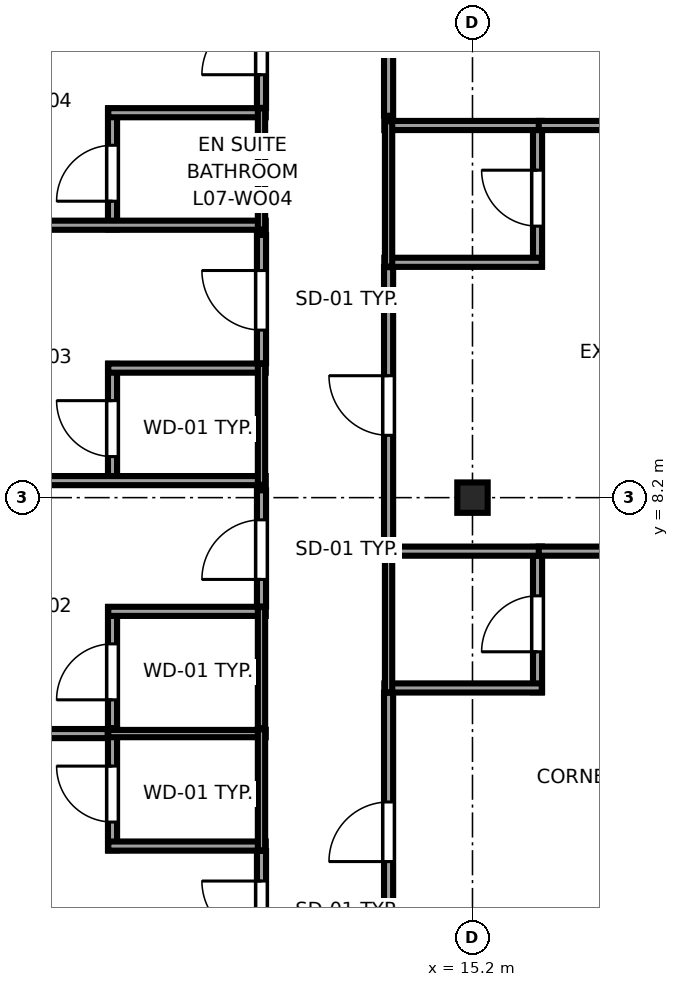
"""IFC4 building model, lengths in metres.
Left out: names, types, materials, properties, quantities, classifications, styles, units other than length and angle.
Written with IfcOpenShell. Run it as: python <this file> out.ifc"""

import sys

from ifc_helpers import new_model, si_unit, direction, frame, frame_2d, origin, origin_2d, place, context, subcontext, project, spatial, rectangle, i_section, extrude, source, transform, mapped, element, fill, save


model = new_model("IFC4")
c1 = context("Model", 3, precision=1e-05, world=origin(), true_north=direction((0.0, 1.0)))
c2 = subcontext(c1, "Body", "Model", "MODEL_VIEW")
j1 = project(units=[si_unit("LENGTHUNIT", "METRE"), si_unit("PLANEANGLEUNIT", "RADIAN")], contexts=[c1])
p1 = place(None, origin())
s1 = spatial("IfcSite", under=j1, at=p1, CompositionType="ELEMENT")
p2 = place(p1, origin())
s2 = spatial("IfcBuilding", under=s1, at=p2, CompositionType="ELEMENT")
p3 = place(p2, frame((0.0, 0.0, 35.55)))
s3 = spatial("IfcBuildingStorey", under=s2, at=p3, CompositionType="ELEMENT", Elevation=35.55)
m1 = source(origin(), c2, "Body", "SweptSolid", [
    extrude(i_section(OverallWidth=0.5, OverallDepth=0.5, WebThickness=0.028, FlangeThickness=0.045, at=origin_2d()), origin(), (0.0, 0.0, 1.0), 3.55),
])
p4 = place(p3, frame((15.2, 8.2, 0.0), z_axis=(0.0, 0.0, 1.0), x_axis=(1.0, 0.0, 0.0)))
e1 = element("IfcColumn", 1, at=p4, inside=s3, PredefinedType="COLUMN", context=c2, shape_type="MappedRepresentation", body=[
    mapped(m1, transform((0.0, 0.0, 0.0), x_axis=(1.0, 0.0, 0.0), y_axis=(0.0, 1.0, 0.0), z_axis=(0.0, 0.0, 1.0), scale=1.0)),
])
p5 = place(p3, frame((9.28, 2.4, 0.0), z_axis=(0.0, 0.0, 1.0), x_axis=(0.0, 1.0, 0.0)))
e2 = element("IfcWall", 2, at=p5, inside=s3, PredefinedType="PARTITIONING", context=c2, shape_type="SweptSolid", body=[
    extrude(rectangle(XDim=1.99, YDim=0.15, at=frame_2d((0.995, 0.0))), origin(), (0.0, 0.0, 1.0), 3.37),
])
p6 = place(p5, frame((0.465, 0.0, 0.0)))
e3 = element("IfcOpeningElement", 3, at=p6, cuts=e2, PredefinedType="OPENING", context=c2, shape_type="SweptSolid", body=[
    extrude(rectangle(XDim=0.92, YDim=2.01, at=frame_2d((0.46, 1.005))), frame((0.0, 0.085, 0.0), z_axis=(0.0, -1.0, 0.0), x_axis=(1.0, 0.0, 0.0)), (0.0, 0.0, 1.0), 0.17),
])
p7 = place(p3, frame((9.21, 2.47, 0.0), z_axis=(0.0, 0.0, 1.0), x_axis=(1.0, 0.0, 0.0)))
e4 = element("IfcWall", 4, at=p7, inside=s3, PredefinedType="PARTITIONING", context=c2, shape_type="SweptSolid", body=[
    extrude(rectangle(XDim=2.59, YDim=0.15, at=frame_2d((1.295, 0.0))), origin(), (0.0, 0.0, 1.0), 3.37),
])
p8 = place(p3, frame((9.21, 4.32, 0.0), z_axis=(0.0, 0.0, 1.0), x_axis=(1.0, 0.0, 0.0)))
e5 = element("IfcWall", 5, at=p8, inside=s3, PredefinedType="PLUMBINGWALL", context=c2, shape_type="SweptSolid", body=[
    extrude(rectangle(XDim=2.59, YDim=0.12, at=frame_2d((1.295, 0.0))), origin(), (0.0, 0.0, 1.0), 3.37),
])
p9 = place(p3, frame((11.73, 2.4, 0.0), z_axis=(0.0, 0.0, 1.0), x_axis=(0.0, 1.0, 0.0)))
e6 = element("IfcWall", 6, at=p9, inside=s3, PredefinedType="PLUMBINGWALL", context=c2, shape_type="SweptSolid", body=[
    extrude(rectangle(XDim=1.99, YDim=0.12, at=frame_2d((0.995, 0.0))), origin(), (0.0, 0.0, 1.0), 3.37),
])
p10 = place(p3, frame((9.28, 4.41, 0.0), z_axis=(0.0, 0.0, 1.0), x_axis=(0.0, 1.0, 0.0)))
e7 = element("IfcWall", 7, at=p10, inside=s3, PredefinedType="PARTITIONING", context=c2, shape_type="SweptSolid", body=[
    extrude(rectangle(XDim=1.99, YDim=0.15, at=frame_2d((0.995, 0.0))), origin(), (0.0, 0.0, 1.0), 3.37),
])
p11 = place(p10, frame((0.465, 0.0, 0.0)))
e8 = element("IfcOpeningElement", 8, at=p11, cuts=e7, PredefinedType="OPENING", context=c2, shape_type="SweptSolid", body=[
    extrude(rectangle(XDim=0.92, YDim=2.01, at=frame_2d((0.46, 1.005))), frame((0.0, 0.085, 0.0), z_axis=(0.0, -1.0, 0.0), x_axis=(1.0, 0.0, 0.0)), (0.0, 0.0, 1.0), 0.17),
])
p12 = place(p3, frame((9.21, 6.33, 0.0), z_axis=(0.0, 0.0, 1.0), x_axis=(1.0, 0.0, 0.0)))
e9 = element("IfcWall", 9, at=p12, inside=s3, PredefinedType="PARTITIONING", context=c2, shape_type="SweptSolid", body=[
    extrude(rectangle(XDim=2.59, YDim=0.15, at=frame_2d((1.295, 0.0))), origin(), (0.0, 0.0, 1.0), 3.37),
])
p13 = place(p3, frame((11.73, 4.41, 0.0), z_axis=(0.0, 0.0, 1.0), x_axis=(0.0, 1.0, 0.0)))
e10 = element("IfcWall", 10, at=p13, inside=s3, PredefinedType="PLUMBINGWALL", context=c2, shape_type="SweptSolid", body=[
    extrude(rectangle(XDim=1.99, YDim=0.12, at=frame_2d((0.995, 0.0))), origin(), (0.0, 0.0, 1.0), 3.37),
])
p14 = place(p3, frame((9.28, 8.41, 0.0), z_axis=(0.0, 0.0, 1.0), x_axis=(0.0, 1.0, 0.0)))
e11 = element("IfcWall", 11, at=p14, inside=s3, PredefinedType="PARTITIONING", context=c2, shape_type="SweptSolid", body=[
    extrude(rectangle(XDim=1.99, YDim=0.15, at=frame_2d((0.995, 0.0))), origin(), (0.0, 0.0, 1.0), 3.37),
])
p15 = place(p14, frame((0.465, 0.0, 0.0)))
e12 = element("IfcOpeningElement", 12, at=p15, cuts=e11, PredefinedType="OPENING", context=c2, shape_type="SweptSolid", body=[
    extrude(rectangle(XDim=0.92, YDim=2.01, at=frame_2d((0.46, 1.005))), frame((0.0, 0.085, 0.0), z_axis=(0.0, -1.0, 0.0), x_axis=(1.0, 0.0, 0.0)), (0.0, 0.0, 1.0), 0.17),
])
p16 = place(p3, frame((0.405, 8.48, 0.0), z_axis=(0.0, 0.0, 1.0), x_axis=(1.0, 0.0, 0.0)))
e13 = element("IfcWall", 13, at=p16, inside=s3, PredefinedType="PARTITIONING", context=c2, shape_type="SweptSolid", body=[
    extrude(rectangle(XDim=11.395, YDim=0.15, at=frame_2d((5.698, 0.0))), origin(), (0.0, 0.0, 1.0), 3.37),
])
p17 = place(p3, frame((9.21, 10.33, 0.0), z_axis=(0.0, 0.0, 1.0), x_axis=(1.0, 0.0, 0.0)))
e14 = element("IfcWall", 14, at=p17, inside=s3, PredefinedType="PARTITIONING", context=c2, shape_type="SweptSolid", body=[
    extrude(rectangle(XDim=2.59, YDim=0.15, at=frame_2d((1.295, 0.0))), origin(), (0.0, 0.0, 1.0), 3.37),
])
p18 = place(p3, frame((11.73, 8.41, 0.0), z_axis=(0.0, 0.0, 1.0), x_axis=(0.0, 1.0, 0.0)))
e15 = element("IfcWall", 15, at=p18, inside=s3, PredefinedType="PLUMBINGWALL", context=c2, shape_type="SweptSolid", body=[
    extrude(rectangle(XDim=1.99, YDim=0.12, at=frame_2d((0.995, 0.0))), origin(), (0.0, 0.0, 1.0), 3.37),
])
p19 = place(p3, frame((9.28, 12.61, 0.0), z_axis=(0.0, 0.0, 1.0), x_axis=(0.0, 1.0, 0.0)))
e16 = element("IfcWall", 16, at=p19, inside=s3, PredefinedType="PARTITIONING", context=c2, shape_type="SweptSolid", body=[
    extrude(rectangle(XDim=1.99, YDim=0.15, at=frame_2d((0.995, 0.0))), origin(), (0.0, 0.0, 1.0), 3.37),
])
p20 = place(p19, frame((0.465, 0.0, 0.0)))
e17 = element("IfcOpeningElement", 17, at=p20, cuts=e16, PredefinedType="OPENING", context=c2, shape_type="SweptSolid", body=[
    extrude(rectangle(XDim=0.92, YDim=2.01, at=frame_2d((0.46, 1.005))), frame((0.0, 0.085, 0.0), z_axis=(0.0, -1.0, 0.0), x_axis=(1.0, 0.0, 0.0)), (0.0, 0.0, 1.0), 0.17),
])
p21 = place(p3, frame((0.405, 12.68, 0.0), z_axis=(0.0, 0.0, 1.0), x_axis=(1.0, 0.0, 0.0)))
e18 = element("IfcWall", 18, at=p21, inside=s3, PredefinedType="PARTITIONING", context=c2, shape_type="SweptSolid", body=[
    extrude(rectangle(XDim=11.395, YDim=0.15, at=frame_2d((5.698, 0.0))), origin(), (0.0, 0.0, 1.0), 3.37),
])
p22 = place(p3, frame((9.21, 14.53, 0.0), z_axis=(0.0, 0.0, 1.0), x_axis=(1.0, 0.0, 0.0)))
e19 = element("IfcWall", 19, at=p22, inside=s3, PredefinedType="PARTITIONING", context=c2, shape_type="SweptSolid", body=[
    extrude(rectangle(XDim=2.59, YDim=0.15, at=frame_2d((1.295, 0.0))), origin(), (0.0, 0.0, 1.0), 3.37),
])
p23 = place(p3, frame((11.73, 12.61, 0.0), z_axis=(0.0, 0.0, 1.0), x_axis=(0.0, 1.0, 0.0)))
e20 = element("IfcWall", 20, at=p23, inside=s3, PredefinedType="PLUMBINGWALL", context=c2, shape_type="SweptSolid", body=[
    extrude(rectangle(XDim=1.99, YDim=0.12, at=frame_2d((0.995, 0.0))), origin(), (0.0, 0.0, 1.0), 3.37),
])
p24 = place(p3, frame((16.27, 5.0, 0.0), z_axis=(0.0, 0.0, 1.0), x_axis=(0.0, 1.0, 0.0)))
e21 = element("IfcWall", 21, at=p24, inside=s3, PredefinedType="PARTITIONING", context=c2, shape_type="SweptSolid", body=[
    extrude(rectangle(XDim=2.39, YDim=0.15, at=frame_2d((1.195, 0.0))), origin(), (0.0, 0.0, 1.0), 3.37),
])
p25 = place(p24, frame((0.665, 0.0, 0.0)))
e22 = element("IfcOpeningElement", 22, at=p25, cuts=e21, PredefinedType="OPENING", context=c2, shape_type="SweptSolid", body=[
    extrude(rectangle(XDim=0.92, YDim=2.01, at=frame_2d((0.46, 1.005))), frame((0.0, 0.085, 0.0), z_axis=(0.0, -1.0, 0.0), x_axis=(1.0, 0.0, 0.0)), (0.0, 0.0, 1.0), 0.17),
])
for number, where, z_axis, x_axis in (
    (23, (13.75, 5.07, 0.0), (0.0, 0.0, 1.0), (1.0, 0.0, 0.0)),
    (24, (13.75, 7.32, 0.0), (0.0, 0.0, 1.0), (1.0, 0.0, 0.0)),
):
    element("IfcWall", number, at=place(p3, frame(where, z_axis=z_axis, x_axis=x_axis)), inside=s3, PredefinedType="PARTITIONING", context=c2, shape_type="SweptSolid", body=[
        extrude(rectangle(XDim=2.59, YDim=0.15, at=frame_2d((1.295, 0.0))), origin(), (0.0, 0.0, 1.0), 3.37),
    ])
p26 = place(p3, frame((13.82, 5.0, 0.0), z_axis=(0.0, 0.0, 1.0), x_axis=(0.0, 1.0, 0.0)))
e25 = element("IfcWall", 25, at=p26, inside=s3, PredefinedType="PLUMBINGWALL", context=c2, shape_type="SweptSolid", body=[
    extrude(rectangle(XDim=2.39, YDim=0.12, at=frame_2d((1.195, 0.0))), origin(), (0.0, 0.0, 1.0), 3.37),
])
p27 = place(p3, frame((16.27, 12.0, 0.0), z_axis=(0.0, 0.0, 1.0), x_axis=(0.0, 1.0, 0.0)))
e26 = element("IfcWall", 26, at=p27, inside=s3, PredefinedType="PARTITIONING", context=c2, shape_type="SweptSolid", body=[
    extrude(rectangle(XDim=2.39, YDim=0.15, at=frame_2d((1.195, 0.0))), origin(), (0.0, 0.0, 1.0), 3.37),
])
p28 = place(p27, frame((0.665, 0.0, 0.0)))
e27 = element("IfcOpeningElement", 27, at=p28, cuts=e26, PredefinedType="OPENING", context=c2, shape_type="SweptSolid", body=[
    extrude(rectangle(XDim=0.92, YDim=2.01, at=frame_2d((0.46, 1.005))), frame((0.0, 0.085, 0.0), z_axis=(0.0, -1.0, 0.0), x_axis=(1.0, 0.0, 0.0)), (0.0, 0.0, 1.0), 0.17),
])
for number, where, z_axis, x_axis in (
    (28, (13.75, 12.07, 0.0), (0.0, 0.0, 1.0), (1.0, 0.0, 0.0)),
    (29, (13.75, 14.32, 0.0), (0.0, 0.0, 1.0), (1.0, 0.0, 0.0)),
):
    element("IfcWall", number, at=place(p3, frame(where, z_axis=z_axis, x_axis=x_axis)), inside=s3, PredefinedType="PARTITIONING", context=c2, shape_type="SweptSolid", body=[
        extrude(rectangle(XDim=2.59, YDim=0.15, at=frame_2d((1.295, 0.0))), origin(), (0.0, 0.0, 1.0), 3.37),
    ])
p29 = place(p3, frame((13.82, 12.0, 0.0), z_axis=(0.0, 0.0, 1.0), x_axis=(0.0, 1.0, 0.0)))
e30 = element("IfcWall", 30, at=p29, inside=s3, PredefinedType="PLUMBINGWALL", context=c2, shape_type="SweptSolid", body=[
    extrude(rectangle(XDim=2.39, YDim=0.12, at=frame_2d((1.195, 0.0))), origin(), (0.0, 0.0, 1.0), 3.37),
])
p30 = place(p3, frame((11.73, 0.405, 0.0), z_axis=(0.0, 0.0, 1.0), x_axis=(0.0, 1.0, 0.0)))
e31 = element("IfcWall", 31, at=p30, inside=s3, PredefinedType="PARTITIONING", context=c2, shape_type="SweptSolid", body=[
    extrude(rectangle(XDim=1.985, YDim=0.15, at=frame_2d((0.992, 0.0))), origin(), (0.0, 0.0, 1.0), 3.37),
])
p31 = place(p30, frame((0.51, 0.0, 0.0)))
e32 = element("IfcOpeningElement", 32, at=p31, cuts=e31, PredefinedType="OPENING", context=c2, shape_type="SweptSolid", body=[
    extrude(rectangle(XDim=0.98, YDim=2.12, at=frame_2d((0.49, 1.06))), frame((0.0, 0.085, 0.0), z_axis=(0.0, -1.0, 0.0), x_axis=(1.0, 0.0, 0.0)), (0.0, 0.0, 1.0), 0.17),
])
p32 = place(p3, frame((0.437, 4.32, 0.0), z_axis=(0.0, 0.0, 1.0), x_axis=(1.0, 0.0, 0.0)))
e33 = element("IfcWall", 33, at=p32, inside=s3, PredefinedType="PARTITIONING", context=c2, shape_type="SweptSolid", body=[
    extrude(rectangle(XDim=8.763, YDim=0.15, at=frame_2d((4.381, 0.0))), origin(), (0.0, 0.0, 1.0), 3.37),
])
p33 = place(p3, frame((11.73, 6.41, 0.0), z_axis=(0.0, 0.0, 1.0), x_axis=(0.0, 1.0, 0.0)))
e34 = element("IfcWall", 34, at=p33, inside=s3, PredefinedType="PARTITIONING", context=c2, shape_type="SweptSolid", body=[
    extrude(rectangle(XDim=1.91, YDim=0.15, at=frame_2d((0.955, 0.0))), origin(), (0.0, 0.0, 1.0), 3.37),
])
p34 = place(p33, frame((0.445, 0.0, 0.0)))
e35 = element("IfcOpeningElement", 35, at=p34, cuts=e34, PredefinedType="OPENING", context=c2, shape_type="SweptSolid", body=[
    extrude(rectangle(XDim=0.98, YDim=2.12, at=frame_2d((0.49, 1.06))), frame((0.0, 0.085, 0.0), z_axis=(0.0, -1.0, 0.0), x_axis=(1.0, 0.0, 0.0)), (0.0, 0.0, 1.0), 0.17),
])
p35 = place(p3, frame((11.73, 10.41, 0.0), z_axis=(0.0, 0.0, 1.0), x_axis=(0.0, 1.0, 0.0)))
e36 = element("IfcWall", 36, at=p35, inside=s3, PredefinedType="PARTITIONING", context=c2, shape_type="SweptSolid", body=[
    extrude(rectangle(XDim=2.11, YDim=0.15, at=frame_2d((1.055, 0.0))), origin(), (0.0, 0.0, 1.0), 3.37),
])
p36 = place(p35, frame((0.545, 0.0, 0.0)))
e37 = element("IfcOpeningElement", 37, at=p36, cuts=e36, PredefinedType="OPENING", context=c2, shape_type="SweptSolid", body=[
    extrude(rectangle(XDim=0.98, YDim=2.12, at=frame_2d((0.49, 1.06))), frame((0.0, 0.085, 0.0), z_axis=(0.0, -1.0, 0.0), x_axis=(1.0, 0.0, 0.0)), (0.0, 0.0, 1.0), 0.17),
])
p37 = place(p3, frame((11.73, 14.61, 0.0), z_axis=(0.0, 0.0, 1.0), x_axis=(0.0, 1.0, 0.0)))
e38 = element("IfcWall", 38, at=p37, inside=s3, PredefinedType="PARTITIONING", context=c2, shape_type="SweptSolid", body=[
    extrude(rectangle(XDim=2.11, YDim=0.15, at=frame_2d((1.055, 0.0))), origin(), (0.0, 0.0, 1.0), 3.37),
])
p38 = place(p37, frame((0.545, 0.0, 0.0)))
e39 = element("IfcOpeningElement", 39, at=p38, cuts=e38, PredefinedType="OPENING", context=c2, shape_type="SweptSolid", body=[
    extrude(rectangle(XDim=0.98, YDim=2.12, at=frame_2d((0.49, 1.06))), frame((0.0, 0.085, 0.0), z_axis=(0.0, -1.0, 0.0), x_axis=(1.0, 0.0, 0.0)), (0.0, 0.0, 1.0), 0.17),
])
p39 = place(p3, frame((13.82, 0.405, 0.0), z_axis=(0.0, 0.0, 1.0), x_axis=(0.0, 1.0, 0.0)))
e40 = element("IfcWall", 40, at=p39, inside=s3, PredefinedType="PARTITIONING", context=c2, shape_type="SweptSolid", body=[
    extrude(rectangle(XDim=4.585, YDim=0.15, at=frame_2d((2.292, 0.0))), origin(), (0.0, 0.0, 1.0), 3.37),
])
p40 = place(p39, frame((1.81, 0.0, 0.0)))
e41 = element("IfcOpeningElement", 41, at=p40, cuts=e40, PredefinedType="OPENING", context=c2, shape_type="SweptSolid", body=[
    extrude(rectangle(XDim=0.98, YDim=2.12, at=frame_2d((0.49, 1.06))), frame((0.0, 0.085, 0.0), z_axis=(0.0, -1.0, 0.0), x_axis=(1.0, 0.0, 0.0)), (0.0, 0.0, 1.0), 0.17),
])
p41 = place(p3, frame((16.29, 7.32, 0.0), z_axis=(0.0, 0.0, 1.0), x_axis=(1.0, 0.0, 0.0)))
e42 = element("IfcWall", 42, at=p41, inside=s3, PredefinedType="PARTITIONING", context=c2, shape_type="SweptSolid", body=[
    extrude(rectangle(XDim=6.06, YDim=0.15, at=frame_2d((3.03, 0.0))), origin(), (0.0, 0.0, 1.0), 3.37),
])
p42 = place(p3, frame((13.82, 7.48, 0.0), z_axis=(0.0, 0.0, 1.0), x_axis=(0.0, 1.0, 0.0)))
e43 = element("IfcWall", 43, at=p42, inside=s3, PredefinedType="PARTITIONING", context=c2, shape_type="SweptSolid", body=[
    extrude(rectangle(XDim=4.51, YDim=0.15, at=frame_2d((2.255, 0.0))), origin(), (0.0, 0.0, 1.0), 3.37),
])
p43 = place(p42, frame((1.745, 0.0, 0.0)))
e44 = element("IfcOpeningElement", 44, at=p43, cuts=e43, PredefinedType="OPENING", context=c2, shape_type="SweptSolid", body=[
    extrude(rectangle(XDim=0.98, YDim=2.12, at=frame_2d((0.49, 1.06))), frame((0.0, 0.085, 0.0), z_axis=(0.0, -1.0, 0.0), x_axis=(1.0, 0.0, 0.0)), (0.0, 0.0, 1.0), 0.17),
])
p44 = place(p3, frame((16.29, 14.32, 0.0), z_axis=(0.0, 0.0, 1.0), x_axis=(1.0, 0.0, 0.0)))
e45 = element("IfcWall", 45, at=p44, inside=s3, PredefinedType="PARTITIONING", context=c2, shape_type="SweptSolid", body=[
    extrude(rectangle(XDim=6.06, YDim=0.15, at=frame_2d((3.03, 0.0))), origin(), (0.0, 0.0, 1.0), 3.37),
])
p45 = place(p3, frame((13.82, 14.48, 0.0), z_axis=(0.0, 0.0, 1.0), x_axis=(0.0, 1.0, 0.0)))
e46 = element("IfcWall", 46, at=p45, inside=s3, PredefinedType="PARTITIONING", context=c2, shape_type="SweptSolid", body=[
    extrude(rectangle(XDim=4.41, YDim=0.15, at=frame_2d((2.205, 0.0))), origin(), (0.0, 0.0, 1.0), 3.37),
])
p46 = place(p45, frame((1.995, 0.0, 0.0)))
e47 = element("IfcOpeningElement", 47, at=p46, cuts=e46, PredefinedType="OPENING", context=c2, shape_type="SweptSolid", body=[
    extrude(rectangle(XDim=0.98, YDim=2.12, at=frame_2d((0.49, 1.06))), frame((0.0, 0.085, 0.0), z_axis=(0.0, -1.0, 0.0), x_axis=(1.0, 0.0, 0.0)), (0.0, 0.0, 1.0), 0.17),
])
m2 = source(origin(), c2, "Body", "SweptSolid", [
    extrude(rectangle(XDim=0.92, YDim=2.01, at=frame_2d((0.46, 1.005))), frame((0.0, 0.025, 0.0), z_axis=(0.0, -1.0, 0.0), x_axis=(1.0, 0.0, 0.0)), (0.0, 0.0, 1.0), 0.05),
])
p47 = place(p6, origin())
e48 = element("IfcDoor", 48, at=p47, inside=s3, OperationType="SINGLE_SWING_RIGHT", PredefinedType="DOOR", context=c2, shape_type="MappedRepresentation", body=[
    mapped(m2, transform((0.0, 0.0, 0.0), x_axis=(1.0, 0.0, 0.0), y_axis=(0.0, 1.0, 0.0), z_axis=(0.0, 0.0, 1.0), scale=1.0)),
])
fill(e3, e48)
p48 = place(p11, origin())
e49 = element("IfcDoor", 49, at=p48, inside=s3, OperationType="SINGLE_SWING_LEFT", PredefinedType="DOOR", context=c2, shape_type="MappedRepresentation", body=[
    mapped(m2, transform((0.0, 0.0, 0.0), x_axis=(1.0, 0.0, 0.0), y_axis=(0.0, 1.0, 0.0), z_axis=(0.0, 0.0, 1.0), scale=1.0)),
])
fill(e8, e49)
p49 = place(p15, origin())
e50 = element("IfcDoor", 50, at=p49, inside=s3, OperationType="SINGLE_SWING_RIGHT", PredefinedType="DOOR", context=c2, shape_type="MappedRepresentation", body=[
    mapped(m2, transform((0.0, 0.0, 0.0), x_axis=(1.0, 0.0, 0.0), y_axis=(0.0, 1.0, 0.0), z_axis=(0.0, 0.0, 1.0), scale=1.0)),
])
fill(e12, e50)
p50 = place(p20, origin())
e51 = element("IfcDoor", 51, at=p50, inside=s3, OperationType="SINGLE_SWING_LEFT", PredefinedType="DOOR", context=c2, shape_type="MappedRepresentation", body=[
    mapped(m2, transform((0.0, 0.0, 0.0), x_axis=(1.0, 0.0, 0.0), y_axis=(0.0, 1.0, 0.0), z_axis=(0.0, 0.0, 1.0), scale=1.0)),
])
fill(e17, e51)
p51 = place(p25, origin())
e52 = element("IfcDoor", 52, at=p51, inside=s3, OperationType="SINGLE_SWING_LEFT", PredefinedType="DOOR", context=c2, shape_type="MappedRepresentation", body=[
    mapped(m2, transform((0.0, 0.0, 0.0), x_axis=(1.0, 0.0, 0.0), y_axis=(0.0, 1.0, 0.0), z_axis=(0.0, 0.0, 1.0), scale=1.0)),
])
fill(e22, e52)
p52 = place(p28, origin())
e53 = element("IfcDoor", 53, at=p52, inside=s3, OperationType="SINGLE_SWING_RIGHT", PredefinedType="DOOR", context=c2, shape_type="MappedRepresentation", body=[
    mapped(m2, transform((0.0, 0.0, 0.0), x_axis=(1.0, 0.0, 0.0), y_axis=(0.0, 1.0, 0.0), z_axis=(0.0, 0.0, 1.0), scale=1.0)),
])
fill(e27, e53)
m3 = source(origin(), c2, "Body", "SweptSolid", [
    extrude(rectangle(XDim=0.98, YDim=2.12, at=frame_2d((0.49, 1.06))), frame((0.0, 0.025, 0.0), z_axis=(0.0, -1.0, 0.0), x_axis=(1.0, 0.0, 0.0)), (0.0, 0.0, 1.0), 0.05),
])
p53 = place(p31, origin())
e54 = element("IfcDoor", 54, at=p53, inside=s3, OperationType="SINGLE_SWING_RIGHT", PredefinedType="DOOR", context=c2, shape_type="MappedRepresentation", body=[
    mapped(m3, transform((0.0, 0.0, 0.0), x_axis=(1.0, 0.0, 0.0), y_axis=(0.0, 1.0, 0.0), z_axis=(0.0, 0.0, 1.0), scale=1.0)),
])
fill(e32, e54)
p54 = place(p34, origin())
e55 = element("IfcDoor", 55, at=p54, inside=s3, OperationType="SINGLE_SWING_LEFT", PredefinedType="DOOR", context=c2, shape_type="MappedRepresentation", body=[
    mapped(m3, transform((0.0, 0.0, 0.0), x_axis=(1.0, 0.0, 0.0), y_axis=(0.0, 1.0, 0.0), z_axis=(0.0, 0.0, 1.0), scale=1.0)),
])
fill(e35, e55)
p55 = place(p36, origin())
e56 = element("IfcDoor", 56, at=p55, inside=s3, OperationType="SINGLE_SWING_RIGHT", PredefinedType="DOOR", context=c2, shape_type="MappedRepresentation", body=[
    mapped(m3, transform((0.0, 0.0, 0.0), x_axis=(1.0, 0.0, 0.0), y_axis=(0.0, 1.0, 0.0), z_axis=(0.0, 0.0, 1.0), scale=1.0)),
])
fill(e37, e56)
p56 = place(p38, origin())
e57 = element("IfcDoor", 57, at=p56, inside=s3, OperationType="SINGLE_SWING_LEFT", PredefinedType="DOOR", context=c2, shape_type="MappedRepresentation", body=[
    mapped(m3, transform((0.0, 0.0, 0.0), x_axis=(1.0, 0.0, 0.0), y_axis=(0.0, 1.0, 0.0), z_axis=(0.0, 0.0, 1.0), scale=1.0)),
])
fill(e39, e57)
p57 = place(p40, origin())
e58 = element("IfcDoor", 58, at=p57, inside=s3, OperationType="SINGLE_SWING_LEFT", PredefinedType="DOOR", context=c2, shape_type="MappedRepresentation", body=[
    mapped(m3, transform((0.0, 0.0, 0.0), x_axis=(1.0, 0.0, 0.0), y_axis=(0.0, 1.0, 0.0), z_axis=(0.0, 0.0, 1.0), scale=1.0)),
])
fill(e41, e58)
p58 = place(p43, origin())
e59 = element("IfcDoor", 59, at=p58, inside=s3, OperationType="SINGLE_SWING_RIGHT", PredefinedType="DOOR", context=c2, shape_type="MappedRepresentation", body=[
    mapped(m3, transform((0.0, 0.0, 0.0), x_axis=(1.0, 0.0, 0.0), y_axis=(0.0, 1.0, 0.0), z_axis=(0.0, 0.0, 1.0), scale=1.0)),
])
fill(e44, e59)
save(model, sys.argv[1])
